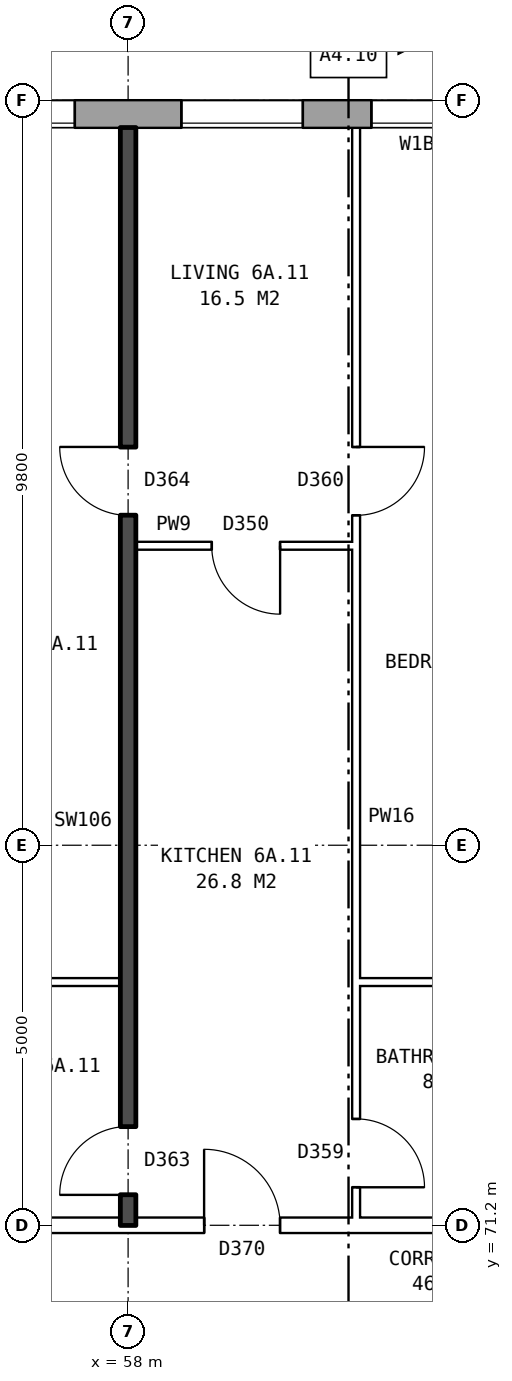
"""IFC4 building model, lengths in metres.
Left out: names, types, materials, properties, quantities, classifications, styles, units other than length and angle.
Written with IfcOpenShell. Run it as: python <this file> out.ifc"""

import sys

from ifc_helpers import new_model, si_unit, direction, frame, frame_2d, origin, place, context, subcontext, project, spatial, rectangle, extrude, element, fill, save


model = new_model("IFC4")
c1 = context("Model", 3, precision=1e-05, world=origin(), true_north=direction((0.0, 1.0)))
c2 = subcontext(c1, "Body", "Model", "MODEL_VIEW")
j1 = project(units=[si_unit("LENGTHUNIT", "METRE"), si_unit("PLANEANGLEUNIT", "RADIAN")], contexts=[c1])
p1 = place(None, origin())
s1 = spatial("IfcSite", under=j1, at=p1, CompositionType="ELEMENT")
p2 = place(p1, origin())
s2 = spatial("IfcBuilding", under=s1, at=p2, CompositionType="ELEMENT")
p3 = place(p2, frame((0.0, 0.0, 25.7)))
s3 = spatial("IfcBuildingStorey", under=s2, at=p3, CompositionType="ELEMENT", Elevation=25.7)
p4 = place(p3, frame((72.925, 85.82, 0.0), z_axis=(0.0, 0.0, 1.0), x_axis=(-1.0, 0.0, 0.0)))
e1 = element("IfcWall", 1, at=p4, inside=s3, PredefinedType="STANDARD", context=c2, shape_type="SweptSolid", body=[
    extrude(rectangle(XDim=50.101, YDim=0.36, at=frame_2d((25.05, 0.0))), origin(), (0.0, 0.0, 1.0), 2.85),
])
p5 = place(p4, frame((0.625, 0.0, 0.8)))
e2 = element("IfcOpeningElement", 2, at=p5, cuts=e1, PredefinedType="OPENING", context=c2, shape_type="SweptSolid", body=[
    extrude(rectangle(XDim=1.6, YDim=1.8, at=frame_2d((0.8, 0.9))), frame((0.0, 0.19, 0.0), z_axis=(0.0, -1.0, 0.0), x_axis=(1.0, 0.0, 0.0)), (0.0, 0.0, 1.0), 0.38),
])
p6 = place(p4, frame((3.625, 0.0, 0.8)))
e3 = element("IfcOpeningElement", 3, at=p6, cuts=e1, PredefinedType="OPENING", context=c2, shape_type="SweptSolid", body=[
    extrude(rectangle(XDim=1.6, YDim=1.8, at=frame_2d((0.8, 0.9))), frame((0.0, 0.19, 0.0), z_axis=(0.0, -1.0, 0.0), x_axis=(1.0, 0.0, 0.0)), (0.0, 0.0, 1.0), 0.38),
])
p7 = place(p4, frame((5.525, 0.0, 0.8)))
e4 = element("IfcOpeningElement", 4, at=p7, cuts=e1, PredefinedType="OPENING", context=c2, shape_type="SweptSolid", body=[
    extrude(rectangle(XDim=1.4, YDim=1.8, at=frame_2d((0.7, 0.9))), frame((0.0, 0.19, 0.0), z_axis=(0.0, -1.0, 0.0), x_axis=(1.0, 0.0, 0.0)), (0.0, 0.0, 1.0), 0.38),
])
p8 = place(p4, frame((9.175, 0.0, 0.15)))
e5 = element("IfcOpeningElement", 5, at=p8, cuts=e1, PredefinedType="OPENING", context=c2, shape_type="SweptSolid", body=[
    extrude(rectangle(XDim=1.0, YDim=0.9, at=frame_2d((0.5, 0.45))), frame((0.0, 0.19, 0.0), z_axis=(0.0, -1.0, 0.0), x_axis=(1.0, 0.0, 0.0)), (0.0, 0.0, 1.0), 0.38),
])
p9 = place(p4, frame((12.625, 0.0, 0.8)))
e6 = element("IfcOpeningElement", 6, at=p9, cuts=e1, PredefinedType="OPENING", context=c2, shape_type="SweptSolid", body=[
    extrude(rectangle(XDim=1.6, YDim=1.8, at=frame_2d((0.8, 0.9))), frame((0.0, 0.19, 0.0), z_axis=(0.0, -1.0, 0.0), x_axis=(1.0, 0.0, 0.0)), (0.0, 0.0, 1.0), 0.38),
])
p10 = place(p4, frame((15.625, 0.0, 0.8)))
e7 = element("IfcOpeningElement", 7, at=p10, cuts=e1, PredefinedType="OPENING", context=c2, shape_type="SweptSolid", body=[
    extrude(rectangle(XDim=1.6, YDim=1.8, at=frame_2d((0.8, 0.9))), frame((0.0, 0.19, 0.0), z_axis=(0.0, -1.0, 0.0), x_axis=(1.0, 0.0, 0.0)), (0.0, 0.0, 1.0), 0.38),
])
p11 = place(p4, frame((18.625, 0.0, 0.8)))
e8 = element("IfcOpeningElement", 8, at=p11, cuts=e1, PredefinedType="OPENING", context=c2, shape_type="SweptSolid", body=[
    extrude(rectangle(XDim=1.6, YDim=1.8, at=frame_2d((0.8, 0.9))), frame((0.0, 0.19, 0.0), z_axis=(0.0, -1.0, 0.0), x_axis=(1.0, 0.0, 0.0)), (0.0, 0.0, 1.0), 0.38),
])
p12 = place(p4, frame((21.625, 0.0, 0.8)))
e9 = element("IfcOpeningElement", 9, at=p12, cuts=e1, PredefinedType="OPENING", context=c2, shape_type="SweptSolid", body=[
    extrude(rectangle(XDim=1.6, YDim=1.8, at=frame_2d((0.8, 0.9))), frame((0.0, 0.19, 0.0), z_axis=(0.0, -1.0, 0.0), x_axis=(1.0, 0.0, 0.0)), (0.0, 0.0, 1.0), 0.38),
])
p13 = place(p4, frame((24.625, 0.0, 0.8)))
e10 = element("IfcOpeningElement", 10, at=p13, cuts=e1, PredefinedType="OPENING", context=c2, shape_type="SweptSolid", body=[
    extrude(rectangle(XDim=1.6, YDim=1.8, at=frame_2d((0.8, 0.9))), frame((0.0, 0.19, 0.0), z_axis=(0.0, -1.0, 0.0), x_axis=(1.0, 0.0, 0.0)), (0.0, 0.0, 1.0), 0.38),
])
p14 = place(p4, frame((27.625, 0.0, 0.8)))
e11 = element("IfcOpeningElement", 11, at=p14, cuts=e1, PredefinedType="OPENING", context=c2, shape_type="SweptSolid", body=[
    extrude(rectangle(XDim=1.6, YDim=1.8, at=frame_2d((0.8, 0.9))), frame((0.0, 0.19, 0.0), z_axis=(0.0, -1.0, 0.0), x_axis=(1.0, 0.0, 0.0)), (0.0, 0.0, 1.0), 0.38),
])
p15 = place(p4, frame((30.625, 0.0, 0.8)))
e12 = element("IfcOpeningElement", 12, at=p15, cuts=e1, PredefinedType="OPENING", context=c2, shape_type="SweptSolid", body=[
    extrude(rectangle(XDim=1.6, YDim=1.8, at=frame_2d((0.8, 0.9))), frame((0.0, 0.19, 0.0), z_axis=(0.0, -1.0, 0.0), x_axis=(1.0, 0.0, 0.0)), (0.0, 0.0, 1.0), 0.38),
])
p16 = place(p4, frame((33.625, 0.0, 0.8)))
e13 = element("IfcOpeningElement", 13, at=p16, cuts=e1, PredefinedType="OPENING", context=c2, shape_type="SweptSolid", body=[
    extrude(rectangle(XDim=1.6, YDim=1.8, at=frame_2d((0.8, 0.9))), frame((0.0, 0.19, 0.0), z_axis=(0.0, -1.0, 0.0), x_axis=(1.0, 0.0, 0.0)), (0.0, 0.0, 1.0), 0.38),
])
p17 = place(p4, frame((36.625, 0.0, 0.8)))
e14 = element("IfcOpeningElement", 14, at=p17, cuts=e1, PredefinedType="OPENING", context=c2, shape_type="SweptSolid", body=[
    extrude(rectangle(XDim=1.6, YDim=1.8, at=frame_2d((0.8, 0.9))), frame((0.0, 0.19, 0.0), z_axis=(0.0, -1.0, 0.0), x_axis=(1.0, 0.0, 0.0)), (0.0, 0.0, 1.0), 0.38),
])
p18 = place(p4, frame((39.125, 0.0, 0.8)))
e15 = element("IfcOpeningElement", 15, at=p18, cuts=e1, PredefinedType="OPENING", context=c2, shape_type="SweptSolid", body=[
    extrude(rectangle(XDim=0.8, YDim=0.9, at=frame_2d((0.4, 0.45))), frame((0.0, 0.19, 0.0), z_axis=(0.0, -1.0, 0.0), x_axis=(1.0, 0.0, 0.0)), (0.0, 0.0, 1.0), 0.38),
])
p19 = place(p4, frame((42.625, 0.0, 0.8)))
e16 = element("IfcOpeningElement", 16, at=p19, cuts=e1, PredefinedType="OPENING", context=c2, shape_type="SweptSolid", body=[
    extrude(rectangle(XDim=1.6, YDim=1.8, at=frame_2d((0.8, 0.9))), frame((0.0, 0.19, 0.0), z_axis=(0.0, -1.0, 0.0), x_axis=(1.0, 0.0, 0.0)), (0.0, 0.0, 1.0), 0.38),
])
p20 = place(p4, frame((45.625, 0.0, 0.8)))
e17 = element("IfcOpeningElement", 17, at=p20, cuts=e1, PredefinedType="OPENING", context=c2, shape_type="SweptSolid", body=[
    extrude(rectangle(XDim=1.6, YDim=1.8, at=frame_2d((0.8, 0.9))), frame((0.0, 0.19, 0.0), z_axis=(0.0, -1.0, 0.0), x_axis=(1.0, 0.0, 0.0)), (0.0, 0.0, 1.0), 0.38),
])
p21 = place(p4, frame((7.225, 0.0, 1.4)))
e18 = element("IfcOpeningElement", 18, at=p21, cuts=e1, PredefinedType="OPENING", context=c2, shape_type="SweptSolid", body=[
    extrude(rectangle(XDim=1.0, YDim=1.2, at=frame_2d((0.5, 0.6))), frame((0.0, 0.19, 0.0), z_axis=(0.0, -1.0, 0.0), x_axis=(1.0, 0.0, 0.0)), (0.0, 0.0, 1.0), 0.38),
])
p22 = place(p4, frame((10.525, 0.0, 0.15)))
e19 = element("IfcOpeningElement", 19, at=p22, cuts=e1, PredefinedType="OPENING", context=c2, shape_type="SweptSolid", body=[
    extrude(rectangle(XDim=1.2, YDim=1.8, at=frame_2d((0.6, 0.9))), frame((0.0, 0.19, 0.0), z_axis=(0.0, -1.0, 0.0), x_axis=(1.0, 0.0, 0.0)), (0.0, 0.0, 1.0), 0.38),
])
p23 = place(p4, frame((41.375, 0.0, 1.7)))
e20 = element("IfcOpeningElement", 20, at=p23, cuts=e1, PredefinedType="OPENING", context=c2, shape_type="SweptSolid", body=[
    extrude(rectangle(XDim=0.8, YDim=0.9, at=frame_2d((0.4, 0.45))), frame((0.0, 0.19, 0.0), z_axis=(0.0, -1.0, 0.0), x_axis=(1.0, 0.0, 0.0)), (0.0, 0.0, 1.0), 0.38),
])
p24 = place(p3, frame((44.36, 71.2, 0.0), z_axis=(0.0, 0.0, 1.0), x_axis=(1.0, 0.0, 0.0)))
e21 = element("IfcWall", 21, at=p24, inside=s3, PredefinedType="PARTITIONING", context=c2, shape_type="SweptSolid", body=[
    extrude(rectangle(XDim=19.28, YDim=0.2, at=frame_2d((9.64, 0.0))), origin(), (0.0, 0.0, 1.0), 2.85),
])
p25 = place(p24, frame((14.64, 0.0, 0.0)))
e22 = element("IfcOpeningElement", 22, at=p25, cuts=e21, PredefinedType="OPENING", context=c2, shape_type="SweptSolid", body=[
    extrude(rectangle(XDim=1.0, YDim=2.1, at=frame_2d((0.5, 1.05))), frame((0.0, 0.11, 0.0), z_axis=(0.0, -1.0, 0.0), x_axis=(1.0, 0.0, 0.0)), (0.0, 0.0, 1.0), 0.22),
])
p26 = place(p24, frame((5.64, 0.0, 0.0)))
e23 = element("IfcOpeningElement", 23, at=p26, cuts=e21, PredefinedType="OPENING", context=c2, shape_type="SweptSolid", body=[
    extrude(rectangle(XDim=1.0, YDim=2.1, at=frame_2d((0.5, 1.05))), frame((0.0, 0.11, 0.0), z_axis=(0.0, -1.0, 0.0), x_axis=(1.0, 0.0, 0.0)), (0.0, 0.0, 1.0), 0.22),
])
p27 = place(p3, frame((55.1, 74.4, 0.0), z_axis=(0.0, 0.0, 1.0), x_axis=(1.0, 0.0, 0.0)))
e24 = element("IfcWall", 24, at=p27, inside=s3, PredefinedType="PARTITIONING", context=c2, shape_type="SweptSolid", body=[
    extrude(rectangle(XDim=2.8, YDim=0.1, at=frame_2d((1.4, 0.0))), origin(), (0.0, 0.0, 1.0), 2.85),
])
p28 = place(p3, frame((61.0, 74.4, 0.0), z_axis=(0.0, 0.0, 1.0), x_axis=(1.0, 0.0, 0.0)))
e25 = element("IfcWall", 25, at=p28, inside=s3, PredefinedType="PARTITIONING", context=c2, shape_type="SweptSolid", body=[
    extrude(rectangle(XDim=2.64, YDim=0.1, at=frame_2d((1.32, 0.0))), origin(), (0.0, 0.0, 1.0), 2.85),
])
p29 = place(p3, frame((58.1, 80.14, 0.0), z_axis=(0.0, 0.0, 1.0), x_axis=(1.0, 0.0, 0.0)))
e26 = element("IfcWall", 26, at=p29, inside=s3, PredefinedType="PARTITIONING", context=c2, shape_type="SweptSolid", body=[
    extrude(rectangle(XDim=2.9, YDim=0.1, at=frame_2d((1.45, 0.0))), origin(), (0.0, 0.0, 1.0), 2.85),
])
p30 = place(p29, frame((1.0, 0.0, 0.0)))
e27 = element("IfcOpeningElement", 27, at=p30, cuts=e26, PredefinedType="OPENING", context=c2, shape_type="SweptSolid", body=[
    extrude(rectangle(XDim=0.9, YDim=2.1, at=frame_2d((0.45, 1.05))), frame((0.0, 0.06, 0.0), z_axis=(0.0, -1.0, 0.0), x_axis=(1.0, 0.0, 0.0)), (0.0, 0.0, 1.0), 0.12),
])
p31 = place(p3, frame((58.0, 71.2, 0.0), z_axis=(0.0, 0.0, 1.0), x_axis=(0.0, 1.0, 0.0)))
e28 = element("IfcWall", 28, at=p31, inside=s3, PredefinedType="SOLIDWALL", context=c2, shape_type="SweptSolid", body=[
    extrude(rectangle(XDim=14.44, YDim=0.2, at=frame_2d((7.22, 0.0))), origin(), (0.0, 0.0, 1.0), 2.85),
])
p32 = place(p31, frame((9.34, 0.0, 0.0)))
e29 = element("IfcOpeningElement", 29, at=p32, cuts=e28, PredefinedType="OPENING", context=c2, shape_type="SweptSolid", body=[
    extrude(rectangle(XDim=0.9, YDim=2.1, at=frame_2d((0.45, 1.05))), frame((0.0, 0.11, 0.0), z_axis=(0.0, -1.0, 0.0), x_axis=(1.0, 0.0, 0.0)), (0.0, 0.0, 1.0), 0.22),
])
p33 = place(p31, frame((0.4, 0.0, 0.0)))
e30 = element("IfcOpeningElement", 30, at=p33, cuts=e28, PredefinedType="OPENING", context=c2, shape_type="SweptSolid", body=[
    extrude(rectangle(XDim=0.9, YDim=2.1, at=frame_2d((0.45, 1.05))), frame((0.0, 0.11, 0.0), z_axis=(0.0, -1.0, 0.0), x_axis=(1.0, 0.0, 0.0)), (0.0, 0.0, 1.0), 0.22),
])
p34 = place(p3, frame((61.0, 71.3, 0.0), z_axis=(0.0, 0.0, 1.0), x_axis=(0.0, 1.0, 0.0)))
e31 = element("IfcWall", 31, at=p34, inside=s3, PredefinedType="PARTITIONING", context=c2, shape_type="SweptSolid", body=[
    extrude(rectangle(XDim=14.34, YDim=0.1, at=frame_2d((7.17, 0.0))), origin(), (0.0, 0.0, 1.0), 2.85),
])
p35 = place(p34, frame((9.24, 0.0, 0.0)))
e32 = element("IfcOpeningElement", 32, at=p35, cuts=e31, PredefinedType="OPENING", context=c2, shape_type="SweptSolid", body=[
    extrude(rectangle(XDim=0.9, YDim=2.1, at=frame_2d((0.45, 1.05))), frame((0.0, 0.06, 0.0), z_axis=(0.0, -1.0, 0.0), x_axis=(1.0, 0.0, 0.0)), (0.0, 0.0, 1.0), 0.12),
])
p36 = place(p34, frame((0.4, 0.0, 0.0)))
e33 = element("IfcOpeningElement", 33, at=p36, cuts=e31, PredefinedType="OPENING", context=c2, shape_type="SweptSolid", body=[
    extrude(rectangle(XDim=0.9, YDim=2.1, at=frame_2d((0.45, 1.05))), frame((0.0, 0.06, 0.0), z_axis=(0.0, -1.0, 0.0), x_axis=(1.0, 0.0, 0.0)), (0.0, 0.0, 1.0), 0.12),
])
p37 = place(p9, origin())
e34 = element("IfcWindow", 34, at=p37, inside=s3, PartitioningType="SINGLE_PANEL", PredefinedType="WINDOW", context=c2, shape_type="SweptSolid", body=[
    extrude(rectangle(XDim=1.6, YDim=1.8, at=frame_2d((0.8, 0.9))), frame((0.0, 0.15, 0.0), z_axis=(0.0, -1.0, 0.0), x_axis=(1.0, 0.0, 0.0)), (0.0, 0.0, 1.0), 0.06),
])
fill(e6, e34)
p38 = place(p10, origin())
e35 = element("IfcWindow", 35, at=p38, inside=s3, PartitioningType="SINGLE_PANEL", PredefinedType="WINDOW", context=c2, shape_type="SweptSolid", body=[
    extrude(rectangle(XDim=1.6, YDim=1.8, at=frame_2d((0.8, 0.9))), frame((0.0, 0.15, 0.0), z_axis=(0.0, -1.0, 0.0), x_axis=(1.0, 0.0, 0.0)), (0.0, 0.0, 1.0), 0.06),
])
fill(e7, e35)
p39 = place(p35, frame((0.9, 0.0, 0.0), z_axis=(0.0, 0.0, 1.0), x_axis=(-1.0, 0.0, 0.0)))
e36 = element("IfcDoor", 36, at=p39, inside=s3, OperationType="SINGLE_SWING_LEFT", PredefinedType="DOOR", context=c2, shape_type="SweptSolid", body=[
    extrude(rectangle(XDim=0.9, YDim=2.1, at=frame_2d((0.45, 1.05))), frame((0.0, 0.025, 0.0), z_axis=(0.0, -1.0, 0.0), x_axis=(1.0, 0.0, 0.0)), (0.0, 0.0, 1.0), 0.05),
])
fill(e32, e36)
p40 = place(p32, origin())
e37 = element("IfcDoor", 37, at=p40, inside=s3, OperationType="SINGLE_SWING_RIGHT", PredefinedType="DOOR", context=c2, shape_type="SweptSolid", body=[
    extrude(rectangle(XDim=0.9, YDim=2.1, at=frame_2d((0.45, 1.05))), frame((0.0, 0.025, 0.0), z_axis=(0.0, -1.0, 0.0), x_axis=(1.0, 0.0, 0.0)), (0.0, 0.0, 1.0), 0.05),
])
fill(e29, e37)
p41 = place(p25, origin())
e38 = element("IfcDoor", 38, at=p41, inside=s3, OperationType="SINGLE_SWING_LEFT", PredefinedType="DOOR", context=c2, shape_type="SweptSolid", body=[
    extrude(rectangle(XDim=1.0, YDim=2.1, at=frame_2d((0.5, 1.05))), frame((0.0, 0.025, 0.0), z_axis=(0.0, -1.0, 0.0), x_axis=(1.0, 0.0, 0.0)), (0.0, 0.0, 1.0), 0.05),
])
fill(e22, e38)
p42 = place(p30, frame((0.9, 0.0, 0.0), z_axis=(0.0, 0.0, 1.0), x_axis=(-1.0, 0.0, 0.0)))
e39 = element("IfcDoor", 39, at=p42, inside=s3, OperationType="SINGLE_SWING_LEFT", PredefinedType="DOOR", context=c2, shape_type="SweptSolid", body=[
    extrude(rectangle(XDim=0.9, YDim=2.1, at=frame_2d((0.45, 1.05))), frame((0.0, 0.025, 0.0), z_axis=(0.0, -1.0, 0.0), x_axis=(1.0, 0.0, 0.0)), (0.0, 0.0, 1.0), 0.05),
])
fill(e27, e39)
p43 = place(p36, frame((0.9, 0.0, 0.0), z_axis=(0.0, 0.0, 1.0), x_axis=(-1.0, 0.0, 0.0)))
e40 = element("IfcDoor", 40, at=p43, inside=s3, OperationType="SINGLE_SWING_RIGHT", PredefinedType="DOOR", context=c2, shape_type="SweptSolid", body=[
    extrude(rectangle(XDim=0.9, YDim=2.1, at=frame_2d((0.45, 1.05))), frame((0.0, 0.025, 0.0), z_axis=(0.0, -1.0, 0.0), x_axis=(1.0, 0.0, 0.0)), (0.0, 0.0, 1.0), 0.05),
])
fill(e33, e40)
p44 = place(p33, origin())
e41 = element("IfcDoor", 41, at=p44, inside=s3, OperationType="SINGLE_SWING_LEFT", PredefinedType="DOOR", context=c2, shape_type="SweptSolid", body=[
    extrude(rectangle(XDim=0.9, YDim=2.1, at=frame_2d((0.45, 1.05))), frame((0.0, 0.025, 0.0), z_axis=(0.0, -1.0, 0.0), x_axis=(1.0, 0.0, 0.0)), (0.0, 0.0, 1.0), 0.05),
])
fill(e30, e41)
p45 = place(p22, origin())
e42 = element("IfcWindow", 42, at=p45, inside=s3, PartitioningType="SINGLE_PANEL", PredefinedType="WINDOW", context=c2, shape_type="SweptSolid", body=[
    extrude(rectangle(XDim=1.2, YDim=1.8, at=frame_2d((0.6, 0.9))), frame((0.0, 0.15, 0.0), z_axis=(0.0, -1.0, 0.0), x_axis=(1.0, 0.0, 0.0)), (0.0, 0.0, 1.0), 0.06),
])
fill(e19, e42)
save(model, sys.argv[1])
